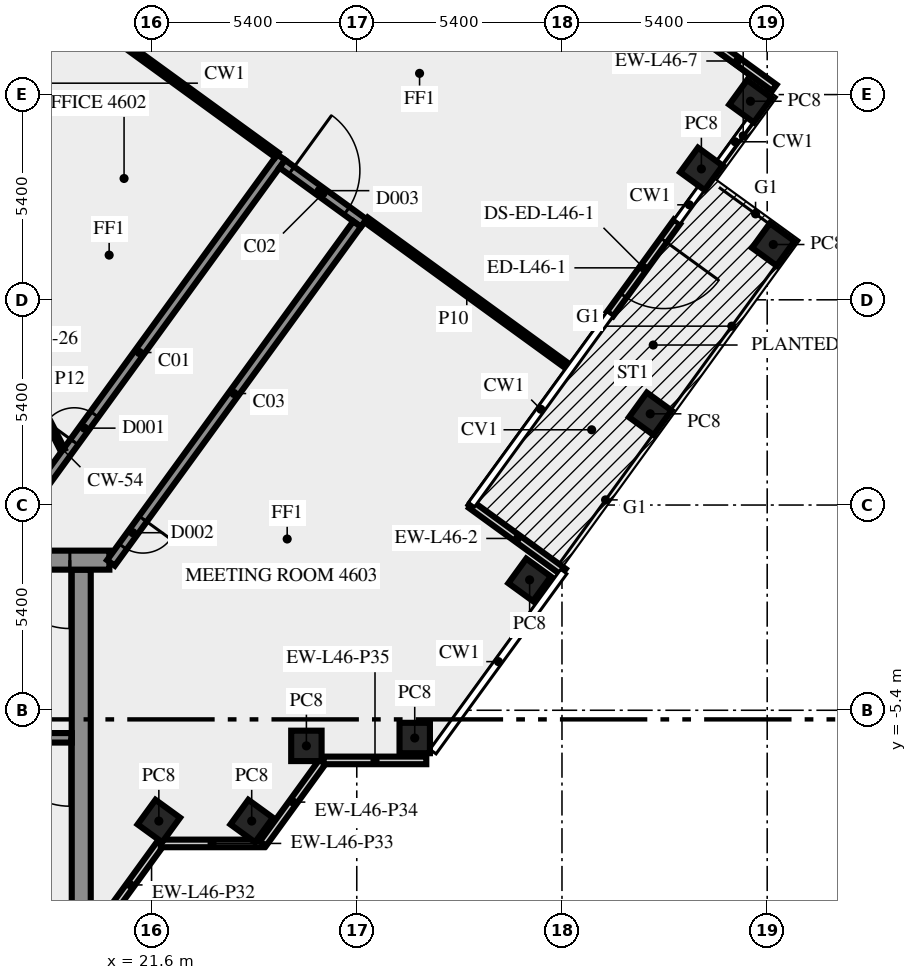
"""IFC4 building model, lengths in metres.
Left out: names, types, materials, properties, quantities, classifications, styles, units other than length and angle.
Written with IfcOpenShell. Run it as: python <this file> out.ifc"""

import sys

from ifc_helpers import new_model, si_unit, direction, frame, frame_2d, origin, origin_2d, place, context, subcontext, project, spatial, rectangle, extrude, element, fill, save


model = new_model("IFC4")
c1 = context("Model", 3, precision=1e-05, world=origin(), true_north=direction((0.0, 1.0)))
c2 = subcontext(c1, "Body", "Model", "MODEL_VIEW")
j1 = project(units=[si_unit("LENGTHUNIT", "METRE"), si_unit("PLANEANGLEUNIT", "RADIAN")], contexts=[c1])
p1 = place(None, origin())
s1 = spatial("IfcSite", under=j1, at=p1, CompositionType="ELEMENT")
p2 = place(p1, origin())
s2 = spatial("IfcBuilding", under=s1, at=p2, CompositionType="ELEMENT")
p3 = place(p2, frame((0.0, 0.0, 198.0)))
s3 = spatial("IfcBuildingStorey", under=s2, at=p3, CompositionType="ELEMENT", Elevation=198.0)
for number, where, z_axis, x_axis in (
    (1, (21.792, -8.315, 0.0), (0.0, 0.0, 1.0), (0.588, 0.809, 0.0)),
    (2, (24.235, -8.315, 0.0), (0.0, 0.0, 1.0), (0.588, 0.809, 0.0)),
    (3, (25.674, -6.337, 0.0), (0.0, 0.0, 1.0), (1.0, 0.0, 0.0)),
    (4, (28.525, -6.13, 0.0), (0.0, 0.0, 1.0), (1.0, 0.0, 0.0)),
    (5, (31.548, -1.969, 0.0), (0.0, 0.0, 1.0), (0.588, 0.809, 0.0)),
    (6, (34.722, 2.4, 0.0), (0.0, 0.0, 1.0), (0.588, 0.809, 0.0)),
    (7, (37.96, 6.855, 0.0), (0.0, 0.0, 1.0), (0.588, 0.809, 0.0)),
    (8, (36.068, 8.844, 0.0), (0.0, 0.0, 1.0), (0.588, 0.809, 0.0)),
    (9, (37.36, 10.625, 0.0), (0.0, 0.0, 1.0), (0.588, 0.809, 0.0)),
):
    element("IfcColumn", number, at=place(p3, frame(where, z_axis=z_axis, x_axis=x_axis)), inside=s3, PredefinedType="COLUMN", context=c2, shape_type="SweptSolid", body=[
        extrude(rectangle(XDim=0.8, YDim=0.8, at=origin_2d()), origin(), (0.0, 0.0, 1.0), 3.65),
    ])
p4 = place(p3, frame((32.441, -1.761, 0.0), z_axis=(0.0, 0.0, 1.0), x_axis=(-0.808999938455, 0.587808727036, 0.0)))
e10 = element("IfcWall", 10, at=p4, inside=s3, PredefinedType="SOLIDWALL", context=c2, shape_type="SweptSolid", body=[
    extrude(rectangle(XDim=3.0, YDim=0.2, at=frame_2d((1.5, 0.0))), origin(), (0.0, 0.0, 1.0), 3.65),
])
p5 = place(p3, frame((35.428, 7.455, 0.0), z_axis=(0.0, 0.0, 1.0), x_axis=(-0.587755461469, -0.809038637837, 0.0)))
e11 = element("IfcWall", 11, at=p5, inside=s3, PredefinedType="SOLIDWALL", context=c2, shape_type="SweptSolid", body=[
    extrude(rectangle(XDim=3.0, YDim=0.2, at=frame_2d((1.5, 0.0))), origin(), (0.0, 0.0, 1.0), 3.65),
])
p6 = place(p5, frame((0.6, 0.0, 0.0)))
e12 = element("IfcOpeningElement", 12, at=p6, cuts=e11, PredefinedType="OPENING", context=c2, shape_type="SweptSolid", body=[
    extrude(rectangle(XDim=1.8, YDim=2.4, at=frame_2d((0.9, 1.2))), frame((0.0, 0.11, 0.0), z_axis=(0.0, -1.0, 0.0), x_axis=(1.0, 0.0, 0.0)), (0.0, 0.0, 1.0), 0.22),
])
p7 = place(p3, frame((37.989, 10.979, 0.0), z_axis=(0.0, 0.0, 1.0), x_axis=(-0.808942790066, 0.587887372207, 0.0)))
e13 = element("IfcWall", 13, at=p7, inside=s3, PredefinedType="SOLIDWALL", context=c2, shape_type="SweptSolid", body=[
    extrude(rectangle(XDim=2.4, YDim=0.2, at=frame_2d((1.2, 0.0))), origin(), (0.0, 0.0, 1.0), 3.65),
])
p8 = place(p3, frame((20.253, -11.083, 0.0), z_axis=(0.0, 0.0, 1.0), x_axis=(0.587766567315, 0.809030569476, 0.0)))
e14 = element("IfcWall", 14, at=p8, inside=s3, PredefinedType="SOLIDWALL", context=c2, shape_type="SweptSolid", body=[
    extrude(rectangle(XDim=2.688, YDim=0.2, at=frame_2d((1.344, 0.0))), origin(), (0.0, 0.0, 1.0), 3.65),
])
p9 = place(p3, frame((21.843, -8.904, 0.0), z_axis=(0.0, 0.0, 1.0), x_axis=(1.0, 0.0, 0.0)))
e15 = element("IfcWall", 15, at=p9, inside=s3, PredefinedType="SOLIDWALL", context=c2, shape_type="SweptSolid", body=[
    extrude(rectangle(XDim=2.7, YDim=0.2, at=frame_2d((1.35, 0.0))), origin(), (0.0, 0.0, 1.0), 3.65),
])
p10 = place(p3, frame((24.533, -8.909, 0.0), z_axis=(0.0, 0.0, 1.0), x_axis=(0.587720002413, 0.809064397168, 0.0)))
e16 = element("IfcWall", 16, at=p10, inside=s3, PredefinedType="SOLIDWALL", context=c2, shape_type="SweptSolid", body=[
    extrude(rectangle(XDim=2.7, YDim=0.2, at=frame_2d((1.35, 0.0))), origin(), (0.0, 0.0, 1.0), 3.65),
])
p11 = place(p3, frame((26.13, -6.719, 0.0), z_axis=(0.0, 0.0, 1.0), x_axis=(1.0, 0.0, 0.0)))
e17 = element("IfcWall", 17, at=p11, inside=s3, PredefinedType="SOLIDWALL", context=c2, shape_type="SweptSolid", body=[
    extrude(rectangle(XDim=2.7, YDim=0.2, at=frame_2d((1.35, 0.0))), origin(), (0.0, 0.0, 1.0), 3.65),
])
p12 = place(p3, frame((19.75, -10.5, 0.0), z_axis=(0.0, 0.0, 1.0), x_axis=(0.0, 1.0, 0.0)))
e18 = element("IfcWall", 18, at=p12, inside=s3, PredefinedType="SHEAR", context=c2, shape_type="SweptSolid", body=[
    extrude(rectangle(XDim=8.8, YDim=0.5, at=frame_2d((4.4, 0.0))), origin(), (0.0, 0.0, 1.0), 3.65),
])
p13 = place(p3, frame((19.5, -6.125, 0.0), z_axis=(0.0, 0.0, 1.0), x_axis=(-1.0, 0.0, 0.0)))
e19 = element("IfcWall", 19, at=p13, inside=s3, PredefinedType="SHEAR", context=c2, shape_type="SweptSolid", body=[
    extrude(rectangle(XDim=8.05, YDim=0.25, at=frame_2d((4.025, 0.0))), origin(), (0.0, 0.0, 1.0), 3.65),
])
p14 = place(p13, frame((0.05, 0.0, 0.0)))
e20 = element("IfcOpeningElement", 20, at=p14, cuts=e19, PredefinedType="OPENING", context=c2, shape_type="SweptSolid", body=[
    extrude(rectangle(XDim=1.8, YDim=2.1, at=frame_2d((0.9, 1.05))), frame((0.0, 0.135, 0.0), z_axis=(0.0, -1.0, 0.0), x_axis=(1.0, 0.0, 0.0)), (0.0, 0.0, 1.0), 0.27),
])
p15 = place(p3, frame((20.49, -1.45, 0.0), z_axis=(0.0, 0.0, 1.0), x_axis=(-1.0, 0.0, 0.0)))
e21 = element("IfcWall", 21, at=p15, inside=s3, PredefinedType="SHEAR", context=c2, shape_type="SweptSolid", body=[
    extrude(rectangle(XDim=40.98, YDim=0.5, at=frame_2d((20.49, 0.0))), origin(), (0.0, 0.0, 1.0), 3.65),
])
p16 = place(p15, frame((38.14, 0.0, 0.0)))
e22 = element("IfcOpeningElement", 22, at=p16, cuts=e21, PredefinedType="OPENING", context=c2, shape_type="SweptSolid", body=[
    extrude(rectangle(XDim=1.8, YDim=2.1, at=frame_2d((0.9, 1.05))), frame((0.0, 0.26, 0.0), z_axis=(0.0, -1.0, 0.0), x_axis=(1.0, 0.0, 0.0)), (0.0, 0.0, 1.0), 0.52),
])
p17 = place(p15, frame((35.89, 0.0, 0.0)))
e23 = element("IfcOpeningElement", 23, at=p17, cuts=e21, PredefinedType="OPENING", context=c2, shape_type="SweptSolid", body=[
    extrude(rectangle(XDim=0.9, YDim=2.1, at=frame_2d((0.45, 1.05))), frame((0.0, 0.26, 0.0), z_axis=(0.0, -1.0, 0.0), x_axis=(1.0, 0.0, 0.0)), (0.0, 0.0, 1.0), 0.52),
])
p18 = place(p15, frame((32.94, 0.0, 0.0)))
e24 = element("IfcOpeningElement", 24, at=p18, cuts=e21, PredefinedType="OPENING", context=c2, shape_type="SweptSolid", body=[
    extrude(rectangle(XDim=0.9, YDim=2.1, at=frame_2d((0.45, 1.05))), frame((0.0, 0.26, 0.0), z_axis=(0.0, -1.0, 0.0), x_axis=(1.0, 0.0, 0.0)), (0.0, 0.0, 1.0), 0.52),
])
p19 = place(p15, frame((30.302, 0.0, 0.0)))
e25 = element("IfcOpeningElement", 25, at=p19, cuts=e21, PredefinedType="OPENING", context=c2, shape_type="SweptSolid", body=[
    extrude(rectangle(XDim=0.9, YDim=2.1, at=frame_2d((0.45, 1.05))), frame((0.0, 0.26, 0.0), z_axis=(0.0, -1.0, 0.0), x_axis=(1.0, 0.0, 0.0)), (0.0, 0.0, 1.0), 0.52),
])
p20 = place(p15, frame((26.577, 0.0, 0.0)))
e26 = element("IfcOpeningElement", 26, at=p20, cuts=e21, PredefinedType="OPENING", context=c2, shape_type="SweptSolid", body=[
    extrude(rectangle(XDim=0.9, YDim=2.1, at=frame_2d((0.45, 1.05))), frame((0.0, 0.26, 0.0), z_axis=(0.0, -1.0, 0.0), x_axis=(1.0, 0.0, 0.0)), (0.0, 0.0, 1.0), 0.52),
])
p21 = place(p15, frame((19.59, 0.0, 0.0)))
e27 = element("IfcOpeningElement", 27, at=p21, cuts=e21, PredefinedType="OPENING", context=c2, shape_type="SweptSolid", body=[
    extrude(rectangle(XDim=2.0, YDim=2.1, at=frame_2d((1.0, 1.05))), frame((0.0, 0.26, 0.0), z_axis=(0.0, -1.0, 0.0), x_axis=(1.0, 0.0, 0.0)), (0.0, 0.0, 1.0), 0.52),
])
p22 = place(p15, frame((7.14, 0.0, 0.0)))
e28 = element("IfcOpeningElement", 28, at=p22, cuts=e21, PredefinedType="OPENING", context=c2, shape_type="SweptSolid", body=[
    extrude(rectangle(XDim=0.9, YDim=2.1, at=frame_2d((0.45, 1.05))), frame((0.0, 0.26, 0.0), z_axis=(0.0, -1.0, 0.0), x_axis=(1.0, 0.0, 0.0)), (0.0, 0.0, 1.0), 0.52),
])
p23 = place(p15, frame((5.028, 0.0, 0.0)))
e29 = element("IfcOpeningElement", 29, at=p23, cuts=e21, PredefinedType="OPENING", context=c2, shape_type="SweptSolid", body=[
    extrude(rectangle(XDim=0.8, YDim=2.1, at=frame_2d((0.4, 1.05))), frame((0.0, 0.26, 0.0), z_axis=(0.0, -1.0, 0.0), x_axis=(1.0, 0.0, 0.0)), (0.0, 0.0, 1.0), 0.52),
])
p24 = place(p15, frame((3.452, 0.0, 0.0)))
e30 = element("IfcOpeningElement", 30, at=p24, cuts=e21, PredefinedType="OPENING", context=c2, shape_type="SweptSolid", body=[
    extrude(rectangle(XDim=0.8, YDim=2.1, at=frame_2d((0.4, 1.05))), frame((0.0, 0.26, 0.0), z_axis=(0.0, -1.0, 0.0), x_axis=(1.0, 0.0, 0.0)), (0.0, 0.0, 1.0), 0.52),
])
p25 = place(p15, frame((1.04, 0.0, 0.0)))
e31 = element("IfcOpeningElement", 31, at=p25, cuts=e21, PredefinedType="OPENING", context=c2, shape_type="SweptSolid", body=[
    extrude(rectangle(XDim=1.8, YDim=2.1, at=frame_2d((0.9, 1.05))), frame((0.0, 0.26, 0.0), z_axis=(0.0, -1.0, 0.0), x_axis=(1.0, 0.0, 0.0)), (0.0, 0.0, 1.0), 0.52),
])
p26 = place(p3, frame((17.545, -1.125, 0.0), z_axis=(0.0, 0.0, 1.0), x_axis=(0.587796810203, 0.809008596935, 0.0)))
e32 = element("IfcWall", 32, at=p26, inside=s3, PredefinedType="SOLIDWALL", context=c2, shape_type="SweptSolid", body=[
    extrude(rectangle(XDim=12.703, YDim=0.25, at=frame_2d((6.352, 0.0))), origin(), (0.0, 0.0, 1.0), 3.65),
])
p27 = place(p26, frame((3.441, 0.0, 0.0)))
e33 = element("IfcOpeningElement", 33, at=p27, cuts=e32, PredefinedType="OPENING", context=c2, shape_type="SweptSolid", body=[
    extrude(rectangle(XDim=0.9, YDim=2.1, at=frame_2d((0.45, 1.05))), frame((0.0, 0.135, 0.0), z_axis=(0.0, -1.0, 0.0), x_axis=(1.0, 0.0, 0.0)), (0.0, 0.0, 1.0), 0.27),
])
p28 = place(p3, frame((25.039, 8.978, 0.0), z_axis=(0.0, 0.0, 1.0), x_axis=(0.809006914995, -0.587799125119, 0.0)))
e34 = element("IfcWall", 34, at=p28, inside=s3, PredefinedType="SOLIDWALL", context=c2, shape_type="SweptSolid", body=[
    extrude(rectangle(XDim=2.65, YDim=0.25, at=frame_2d((1.325, 0.0))), origin(), (0.0, 0.0, 1.0), 3.65),
])
p29 = place(p28, frame((0.301, 0.0, 0.0)))
e35 = element("IfcOpeningElement", 35, at=p29, cuts=e34, PredefinedType="OPENING", context=c2, shape_type="SweptSolid", body=[
    extrude(rectangle(XDim=1.8, YDim=2.1, at=frame_2d((0.9, 1.05))), frame((0.0, 0.135, 0.0), z_axis=(0.0, -1.0, 0.0), x_axis=(1.0, 0.0, 0.0)), (0.0, 0.0, 1.0), 0.27),
])
p30 = place(p3, frame((27.009, 7.392, 0.0), z_axis=(0.0, 0.0, 1.0), x_axis=(-0.587776457057, -0.809023384414, 0.0)))
e36 = element("IfcWall", 36, at=p30, inside=s3, PredefinedType="SOLIDWALL", context=c2, shape_type="SweptSolid", body=[
    extrude(rectangle(XDim=11.021, YDim=0.25, at=frame_2d((5.51, 0.0))), origin(), (0.0, 0.0, 1.0), 3.65),
])
p31 = place(p30, frame((9.588, 0.0, 0.0)))
e37 = element("IfcOpeningElement", 37, at=p31, cuts=e36, PredefinedType="OPENING", context=c2, shape_type="SweptSolid", body=[
    extrude(rectangle(XDim=0.9, YDim=2.1, at=frame_2d((0.45, 1.05))), frame((0.0, 0.135, 0.0), z_axis=(0.0, -1.0, 0.0), x_axis=(1.0, 0.0, 0.0)), (0.0, 0.0, 1.0), 0.27),
])
p32 = place(p3, frame((24.898, 9.21, 0.0), z_axis=(0.0, 0.0, 1.0), x_axis=(-0.809046636998, 0.587744450559, 0.0)))
e38 = element("IfcWall", 38, at=p32, inside=s3, PredefinedType="PARTITIONING", context=c2, shape_type="SweptSolid", body=[
    extrude(rectangle(XDim=9.549, YDim=0.15, at=frame_2d((4.775, 0.0))), origin(), (0.0, 0.0, 1.0), 2.85),
])
p33 = place(p3, frame((32.544, 3.655, 0.0), z_axis=(0.0, 0.0, 1.0), x_axis=(-0.809045452372, 0.587746081226, 0.0)))
e39 = element("IfcWall", 39, at=p33, inside=s3, PredefinedType="PARTITIONING", context=c2, shape_type="SweptSolid", body=[
    extrude(rectangle(XDim=6.55, YDim=0.15, at=frame_2d((3.275, 0.0))), origin(), (0.0, 0.0, 1.0), 3.65),
])
p34 = place(p3, frame((18.0, 3.925, 0.0), z_axis=(0.0, 0.0, 1.0), x_axis=(0.453950796792, -0.891026752736, 0.0)))
e40 = element("IfcWall", 40, at=p34, inside=s3, PredefinedType="PARTITIONING", context=c2, shape_type="SweptSolid", body=[
    extrude(rectangle(XDim=2.778, YDim=0.12, at=frame_2d((1.389, 0.0))), origin(), (0.0, 0.0, 1.0), 3.65),
])
p35 = place(p6, origin())
e41 = element("IfcDoor", 41, at=p35, inside=s3, OperationType="DOUBLE_DOOR_SINGLE_SWING", PredefinedType="DOOR", context=c2, shape_type="SweptSolid", body=[
    extrude(rectangle(XDim=1.8, YDim=2.4, at=frame_2d((0.9, 1.2))), frame((0.0, 0.025, 0.0), z_axis=(0.0, -1.0, 0.0), x_axis=(1.0, 0.0, 0.0)), (0.0, 0.0, 1.0), 0.05),
])
fill(e12, e41)
p36 = place(p14, origin())
e42 = element("IfcDoor", 42, at=p36, inside=s3, OperationType="DOUBLE_DOOR_SINGLE_SWING", PredefinedType="DOOR", context=c2, shape_type="SweptSolid", body=[
    extrude(rectangle(XDim=1.8, YDim=2.1, at=frame_2d((0.9, 1.05))), frame((0.0, 0.025, 0.0), z_axis=(0.0, -1.0, 0.0), x_axis=(1.0, 0.0, 0.0)), (0.0, 0.0, 1.0), 0.05),
])
fill(e20, e42)
p37 = place(p25, origin())
e43 = element("IfcDoor", 43, at=p37, inside=s3, OperationType="DOUBLE_DOOR_SINGLE_SWING", PredefinedType="DOOR", context=c2, shape_type="SweptSolid", body=[
    extrude(rectangle(XDim=1.8, YDim=2.1, at=frame_2d((0.9, 1.05))), frame((0.0, 0.025, 0.0), z_axis=(0.0, -1.0, 0.0), x_axis=(1.0, 0.0, 0.0)), (0.0, 0.0, 1.0), 0.05),
])
fill(e31, e43)
p38 = place(p27, origin())
e44 = element("IfcDoor", 44, at=p38, inside=s3, OperationType="SINGLE_SWING_LEFT", PredefinedType="DOOR", context=c2, shape_type="SweptSolid", body=[
    extrude(rectangle(XDim=0.9, YDim=2.1, at=frame_2d((0.45, 1.05))), frame((0.0, 0.025, 0.0), z_axis=(0.0, -1.0, 0.0), x_axis=(1.0, 0.0, 0.0)), (0.0, 0.0, 1.0), 0.05),
])
fill(e33, e44)
p39 = place(p31, origin())
e45 = element("IfcDoor", 45, at=p39, inside=s3, OperationType="SINGLE_SWING_RIGHT", PredefinedType="DOOR", context=c2, shape_type="SweptSolid", body=[
    extrude(rectangle(XDim=0.9, YDim=2.1, at=frame_2d((0.45, 1.05))), frame((0.0, 0.025, 0.0), z_axis=(0.0, -1.0, 0.0), x_axis=(1.0, 0.0, 0.0)), (0.0, 0.0, 1.0), 0.05),
])
fill(e37, e45)
p40 = place(p29, origin())
e46 = element("IfcDoor", 46, at=p40, inside=s3, OperationType="DOUBLE_DOOR_SINGLE_SWING", PredefinedType="DOOR", context=c2, shape_type="SweptSolid", body=[
    extrude(rectangle(XDim=1.8, YDim=2.1, at=frame_2d((0.9, 1.05))), frame((0.0, 0.025, 0.0), z_axis=(0.0, -1.0, 0.0), x_axis=(1.0, 0.0, 0.0)), (0.0, 0.0, 1.0), 0.05),
])
fill(e35, e46)
save(model, sys.argv[1])
